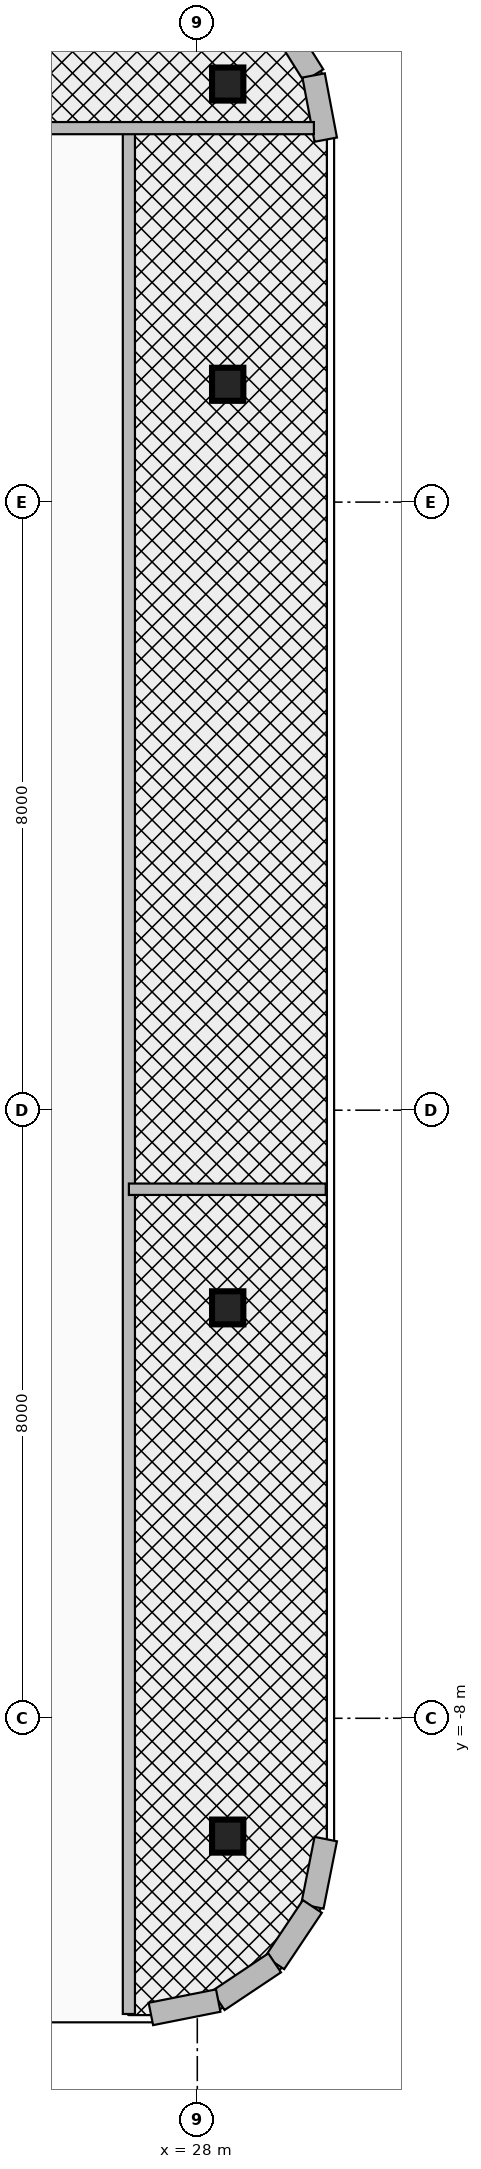
"""IFC4 building model, lengths in metres.
Left out: names, types, materials, properties, quantities, classifications, styles, units other than length and angle.
Written with IfcOpenShell. Run it as: python <this file> out.ifc"""

import sys

from ifc_helpers import new_model, si_unit, direction, frame, frame_2d, origin, origin_2d, place, context, subcontext, project, spatial, rectangle, i_section, extrude, source, transform, mapped, element, fill, save


model = new_model("IFC4")
c1 = context("Model", 3, precision=1e-05, world=origin(), true_north=direction((0.0, 1.0)))
c2 = subcontext(c1, "Body", "Model", "MODEL_VIEW")
j1 = project(units=[si_unit("LENGTHUNIT", "METRE"), si_unit("PLANEANGLEUNIT", "RADIAN")], contexts=[c1])
p1 = place(None, origin())
s1 = spatial("IfcSite", under=j1, at=p1, CompositionType="ELEMENT")
p2 = place(p1, origin())
s2 = spatial("IfcBuilding", under=s1, at=p2, CompositionType="ELEMENT")
p3 = place(p2, frame((0.0, 0.0, 180.5)))
s3 = spatial("IfcBuildingStorey", under=s2, at=p3, CompositionType="ELEMENT", Elevation=180.5)
m1 = source(origin(), c2, "Body", "SweptSolid", [
    extrude(i_section(OverallWidth=0.412, OverallDepth=0.435, WebThickness=0.036, FlangeThickness=0.057, at=origin_2d()), origin(), (0.0, 0.0, 1.0), 3.95),
])
for number, where, z_axis, x_axis in (
    (1, (28.4, -9.55, 0.0), (0.0, 0.0, 1.0), (1.0, 0.0, 0.0)),
    (2, (28.4, -2.6, 0.0), (0.0, 0.0, 1.0), (1.0, 0.0, 0.0)),
    (3, (28.4, 9.55, 0.0), (0.0, 0.0, 1.0), (1.0, 0.0, 0.0)),
    (4, (28.4, 13.5, 0.0), (0.0, 0.0, 1.0), (1.0, 0.0, 0.0)),
):
    element("IfcColumn", number, at=place(p3, frame(where, z_axis=z_axis, x_axis=x_axis)), inside=s3, PredefinedType="COLUMN", context=c2, shape_type="MappedRepresentation", body=[
        mapped(m1, transform((0.0, 0.0, 0.0), x_axis=(1.0, 0.0, 0.0), y_axis=(0.0, 1.0, 0.0), z_axis=(0.0, 0.0, 1.0), scale=1.0)),
    ])
p4 = place(p3, frame((29.079, 14.333, 0.0), z_axis=(0.0, 0.0, 1.0), x_axis=(0.53134147342, -0.847157741288, 0.0)))
e5 = element("IfcWall", 5, at=p4, inside=s3, PredefinedType="SOLIDWALL", context=c2, shape_type="SweptSolid", body=[
    extrude(rectangle(XDim=0.85, YDim=0.3, at=frame_2d((0.425, 0.0))), origin(), (0.0, 0.0, 1.0), 3.63),
])
p5 = place(p3, frame((29.531, 13.613, 0.0), z_axis=(0.0, 0.0, 1.0), x_axis=(0.185402686284, -0.982662629756, 0.0)))
e6 = element("IfcWall", 6, at=p5, inside=s3, PredefinedType="SOLIDWALL", context=c2, shape_type="SweptSolid", body=[
    extrude(rectangle(XDim=0.86, YDim=0.3, at=frame_2d((0.43, 0.0))), origin(), (0.0, 0.0, 1.0), 3.63),
])
p6 = place(p3, frame((29.69, -9.589, 0.0), z_axis=(0.0, 0.0, 1.0), x_axis=(-0.195025152871, -0.980798241101, 0.0)))
e7 = element("IfcWall", 7, at=p6, inside=s3, PredefinedType="SOLIDWALL", context=c2, shape_type="SweptSolid", body=[
    extrude(rectangle(XDim=0.904, YDim=0.3, at=frame_2d((0.452, 0.0))), origin(), (0.0, 0.0, 1.0), 3.63),
])
p7 = place(p3, frame((29.514, -10.476, 0.0), z_axis=(0.0, 0.0, 1.0), x_axis=(-0.555520488502, -0.831502848374, 0.0)))
e8 = element("IfcWall", 8, at=p7, inside=s3, PredefinedType="SOLIDWALL", context=c2, shape_type="SweptSolid", body=[
    extrude(rectangle(XDim=0.893, YDim=0.3, at=frame_2d((0.446, 0.0))), origin(), (0.0, 0.0, 1.0), 3.63),
])
p8 = place(p3, frame((29.018, -11.218, 0.0), z_axis=(0.0, 0.0, 1.0), x_axis=(-0.83158722889, -0.555394167009, 0.0)))
e9 = element("IfcWall", 9, at=p8, inside=s3, PredefinedType="SOLIDWALL", context=c2, shape_type="SweptSolid", body=[
    extrude(rectangle(XDim=0.893, YDim=0.3, at=frame_2d((0.446, 0.0))), origin(), (0.0, 0.0, 1.0), 3.63),
])
p9 = place(p3, frame((28.275, -11.714, 0.0), z_axis=(0.0, 0.0, 1.0), x_axis=(-0.980787963133, -0.19507683454, 0.0)))
e10 = element("IfcWall", 10, at=p9, inside=s3, PredefinedType="SOLIDWALL", context=c2, shape_type="SweptSolid", body=[
    extrude(rectangle(XDim=0.904, YDim=0.3, at=frame_2d((0.452, 0.0))), origin(), (0.0, 0.0, 1.0), 3.63),
])
p10 = place(p3, frame((27.1, -11.89, 0.0), z_axis=(0.0, 0.0, 1.0), x_axis=(0.0, 1.0, 0.0)))
e11 = element("IfcWall", 11, at=p10, inside=s3, PredefinedType="PARTITIONING", context=c2, shape_type="SweptSolid", body=[
    extrude(rectangle(XDim=24.81, YDim=0.16, at=frame_2d((12.405, 0.0))), origin(), (0.0, 0.0, 1.0), 2.665),
])
p11 = place(p10, frame((4.525, 0.0, 0.0)))
e12 = element("IfcOpeningElement", 12, at=p11, cuts=e11, PredefinedType="OPENING", context=c2, shape_type="SweptSolid", body=[
    extrude(rectangle(XDim=1.8, YDim=2.15, at=frame_2d((0.9, 1.075))), frame((0.0, 0.095, 0.0), z_axis=(0.0, -1.0, 0.0), x_axis=(1.0, 0.0, 0.0)), (0.0, 0.0, 1.0), 0.19),
])
p12 = place(p10, frame((16.93, 0.0, 0.0)))
e13 = element("IfcOpeningElement", 13, at=p12, cuts=e11, PredefinedType="OPENING", context=c2, shape_type="SweptSolid", body=[
    extrude(rectangle(XDim=1.8, YDim=2.15, at=frame_2d((0.9, 1.075))), frame((0.0, 0.095, 0.0), z_axis=(0.0, -1.0, 0.0), x_axis=(1.0, 0.0, 0.0)), (0.0, 0.0, 1.0), 0.19),
])
p13 = place(p3, frame((25.6, 12.92, 0.0), z_axis=(0.0, 0.0, 1.0), x_axis=(1.0, 0.0, 0.0)))
e14 = element("IfcWall", 14, at=p13, inside=s3, PredefinedType="PARTITIONING", context=c2, shape_type="SweptSolid", body=[
    extrude(rectangle(XDim=3.934, YDim=0.16, at=frame_2d((1.967, 0.0))), origin(), (0.0, 0.0, 1.0), 3.076),
])
p14 = place(p13, frame((0.3, 0.0, 0.0)))
e15 = element("IfcOpeningElement", 15, at=p14, cuts=e14, PredefinedType="OPENING", context=c2, shape_type="SweptSolid", body=[
    extrude(rectangle(XDim=0.9, YDim=2.1, at=frame_2d((0.45, 1.05))), frame((0.0, 0.095, 0.0), z_axis=(0.0, -1.0, 0.0), x_axis=(1.0, 0.0, 0.0)), (0.0, 0.0, 1.0), 0.19),
])
p15 = place(p3, frame((27.1, -1.04, 0.0), z_axis=(0.0, 0.0, 1.0), x_axis=(1.0, 0.0, 0.0)))
e16 = element("IfcWall", 16, at=p15, inside=s3, PredefinedType="PARTITIONING", context=c2, shape_type="SweptSolid", body=[
    extrude(rectangle(XDim=2.59, YDim=0.15, at=frame_2d((1.295, 0.0))), origin(), (0.0, 0.0, 1.0), 3.076),
])
p16 = place(p14, origin())
e17 = element("IfcDoor", 17, at=p16, inside=s3, OperationType="SINGLE_SWING_LEFT", PredefinedType="DOOR", context=c2, shape_type="SweptSolid", body=[
    extrude(rectangle(XDim=0.9, YDim=2.1, at=frame_2d((0.45, 1.05))), frame((0.0, 0.025, 0.0), z_axis=(0.0, -1.0, 0.0), x_axis=(1.0, 0.0, 0.0)), (0.0, 0.0, 1.0), 0.05),
])
fill(e15, e17)
p17 = place(p11, origin())
e18 = element("IfcDoor", 18, at=p17, inside=s3, OperationType="DOUBLE_DOOR_SINGLE_SWING", PredefinedType="DOOR", context=c2, shape_type="SweptSolid", body=[
    extrude(rectangle(XDim=1.8, YDim=2.15, at=frame_2d((0.9, 1.075))), frame((0.0, 0.025, 0.0), z_axis=(0.0, -1.0, 0.0), x_axis=(1.0, 0.0, 0.0)), (0.0, 0.0, 1.0), 0.05),
])
fill(e12, e18)
p18 = place(p12, frame((1.8, 0.0, 0.0), z_axis=(0.0, 0.0, 1.0), x_axis=(-1.0, 0.0, 0.0)))
e19 = element("IfcDoor", 19, at=p18, inside=s3, OperationType="DOUBLE_DOOR_SINGLE_SWING", PredefinedType="DOOR", context=c2, shape_type="SweptSolid", body=[
    extrude(rectangle(XDim=1.8, YDim=2.15, at=frame_2d((0.9, 1.075))), frame((0.0, 0.025, 0.0), z_axis=(0.0, -1.0, 0.0), x_axis=(1.0, 0.0, 0.0)), (0.0, 0.0, 1.0), 0.05),
])
fill(e13, e19)
save(model, sys.argv[1])
